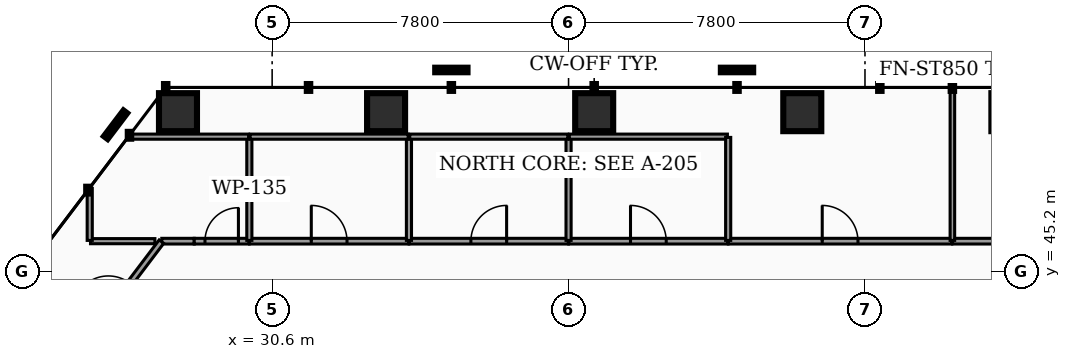
"""IFC4 building model, lengths in metres.
Left out: names, types, materials, properties, quantities, classifications, styles, units other than length and angle.
Written with IfcOpenShell. Run it as: python <this file> out.ifc"""

import sys

from ifc_helpers import new_model, si_unit, direction, frame, frame_2d, origin, origin_2d, place, context, subcontext, project, spatial, rectangle, hollow_rectangle, extrude, element, fill, save


model = new_model("IFC4")
c1 = context("Model", 3, precision=1e-05, world=origin(), true_north=direction((0.0, 1.0)))
c2 = subcontext(c1, "Body", "Model", "MODEL_VIEW")
j1 = project(units=[si_unit("LENGTHUNIT", "METRE"), si_unit("PLANEANGLEUNIT", "RADIAN")], contexts=[c1])
p1 = place(None, origin())
s1 = spatial("IfcSite", under=j1, at=p1, CompositionType="ELEMENT")
p2 = place(p1, origin())
s2 = spatial("IfcBuilding", under=s1, at=p2, CompositionType="ELEMENT")
p3 = place(p2, frame((0.0, 0.0, 39.78)))
s3 = spatial("IfcBuildingStorey", under=s2, at=p3, CompositionType="ELEMENT", Elevation=39.78)
for number, where, z_axis, x_axis in (
    (1, (44.55, 49.394, 0.0), (0.0, 0.0, 1.0), (1.0, 0.0, 0.0)),
    (2, (39.074, 49.394, 0.0), (0.0, 0.0, 1.0), (1.0, 0.0, 0.0)),
    (3, (33.598, 49.394, 0.0), (0.0, 0.0, 1.0), (1.0, 0.0, 0.0)),
    (4, (28.122, 49.394, 0.0), (0.0, 0.0, 1.0), (1.0, 0.0, 0.0)),
):
    element("IfcColumn", number, at=place(p3, frame(where, z_axis=z_axis, x_axis=x_axis)), inside=s3, PredefinedType="COLUMN", context=c2, shape_type="SweptSolid", body=[
        extrude(hollow_rectangle(XDim=1.0, YDim=1.0, WallThickness=0.05, at=origin_2d()), origin(), (0.0, 0.0, 1.0), 3.82),
    ])
p4 = place(p3, frame((27.696, 46.0, 0.0), z_axis=(0.0, 0.0, 1.0), x_axis=(1.0, 0.0, 0.0)))
e5 = element("IfcWall", 5, at=p4, inside=s3, PredefinedType="PARTITIONING", context=c2, shape_type="SweptSolid", body=[
    extrude(rectangle(XDim=0.854, YDim=0.15, at=frame_2d((0.427, 0.0))), origin(), (0.0, 0.0, 1.0), 2.777),
])
p5 = place(p3, frame((28.55, 46.0, 0.0), z_axis=(0.0, 0.0, 1.0), x_axis=(1.0, 0.0, 0.0)))
e6 = element("IfcWall", 6, at=p5, inside=s3, PredefinedType="PARTITIONING", context=c2, shape_type="SweptSolid", body=[
    extrude(rectangle(XDim=1.445, YDim=0.15, at=frame_2d((0.723, 0.0))), origin(), (0.0, 0.0, 1.0), 2.777),
])
p6 = place(p5, frame((0.282, 0.0, 0.0)))
e7 = element("IfcOpeningElement", 7, at=p6, cuts=e6, PredefinedType="OPENING", context=c2, shape_type="SweptSolid", body=[
    extrude(rectangle(XDim=0.88, YDim=2.05, at=frame_2d((0.44, 1.025))), frame((0.0, 0.085, 0.0), z_axis=(0.0, -1.0, 0.0), x_axis=(1.0, 0.0, 0.0)), (0.0, 0.0, 1.0), 0.17),
])
p7 = place(p3, frame((30.005, 46.0, 0.0), z_axis=(0.0, 0.0, 1.0), x_axis=(1.0, 0.0, 0.0)))
e8 = element("IfcWall", 8, at=p7, inside=s3, PredefinedType="PARTITIONING", context=c2, shape_type="SweptSolid", body=[
    extrude(rectangle(XDim=4.19, YDim=0.15, at=frame_2d((2.095, 0.0))), origin(), (0.0, 0.0, 1.0), 2.777),
])
p8 = place(p7, frame((1.625, 0.0, 0.0)))
e9 = element("IfcOpeningElement", 9, at=p8, cuts=e8, PredefinedType="OPENING", context=c2, shape_type="SweptSolid", body=[
    extrude(rectangle(XDim=0.94, YDim=2.05, at=frame_2d((0.47, 1.025))), frame((0.0, 0.085, 0.0), z_axis=(0.0, -1.0, 0.0), x_axis=(1.0, 0.0, 0.0)), (0.0, 0.0, 1.0), 0.17),
])
p9 = place(p3, frame((34.205, 46.0, 0.0), z_axis=(0.0, 0.0, 1.0), x_axis=(1.0, 0.0, 0.0)))
e10 = element("IfcWall", 10, at=p9, inside=s3, PredefinedType="PARTITIONING", context=c2, shape_type="SweptSolid", body=[
    extrude(rectangle(XDim=4.19, YDim=0.15, at=frame_2d((2.095, 0.0))), origin(), (0.0, 0.0, 1.0), 2.777),
])
p10 = place(p9, frame((1.625, 0.0, 0.0)))
e11 = element("IfcOpeningElement", 11, at=p10, cuts=e10, PredefinedType="OPENING", context=c2, shape_type="SweptSolid", body=[
    extrude(rectangle(XDim=0.94, YDim=2.05, at=frame_2d((0.47, 1.025))), frame((0.0, 0.085, 0.0), z_axis=(0.0, -1.0, 0.0), x_axis=(1.0, 0.0, 0.0)), (0.0, 0.0, 1.0), 0.17),
])
p11 = place(p3, frame((38.405, 46.0, 0.0), z_axis=(0.0, 0.0, 1.0), x_axis=(1.0, 0.0, 0.0)))
e12 = element("IfcWall", 12, at=p11, inside=s3, PredefinedType="PARTITIONING", context=c2, shape_type="SweptSolid", body=[
    extrude(rectangle(XDim=4.19, YDim=0.15, at=frame_2d((2.095, 0.0))), origin(), (0.0, 0.0, 1.0), 2.777),
])
p12 = place(p11, frame((1.625, 0.0, 0.0)))
e13 = element("IfcOpeningElement", 13, at=p12, cuts=e12, PredefinedType="OPENING", context=c2, shape_type="SweptSolid", body=[
    extrude(rectangle(XDim=0.94, YDim=2.05, at=frame_2d((0.47, 1.025))), frame((0.0, 0.085, 0.0), z_axis=(0.0, -1.0, 0.0), x_axis=(1.0, 0.0, 0.0)), (0.0, 0.0, 1.0), 0.17),
])
p13 = place(p3, frame((25.462, 43.051, 0.0), z_axis=(0.0, 0.0, 1.0), x_axis=(0.603862791153, 0.7970882821, 0.0)))
e14 = element("IfcWall", 14, at=p13, inside=s3, PredefinedType="PARTITIONING", context=c2, shape_type="SweptSolid", body=[
    extrude(rectangle(XDim=3.684, YDim=0.15, at=frame_2d((1.842, 0.0))), origin(), (0.0, 0.0, 1.0), 2.777),
])
p14 = place(p13, frame((1.372, 0.0, 0.0)))
e15 = element("IfcOpeningElement", 15, at=p14, cuts=e14, PredefinedType="OPENING", context=c2, shape_type="SweptSolid", body=[
    extrude(rectangle(XDim=0.94, YDim=2.05, at=frame_2d((0.47, 1.025))), frame((0.0, 0.085, 0.0), z_axis=(0.0, -1.0, 0.0), x_axis=(1.0, 0.0, 0.0)), (0.0, 0.0, 1.0), 0.17),
])
p15 = place(p3, frame((48.505, 46.0, 0.0), z_axis=(0.0, 0.0, 1.0), x_axis=(1.0, 0.0, 0.0)))
e16 = element("IfcWall", 16, at=p15, inside=s3, PredefinedType="PARTITIONING", context=c2, shape_type="SweptSolid", body=[
    extrude(rectangle(XDim=1.925, YDim=0.15, at=frame_2d((0.962, 0.0))), origin(), (0.0, 0.0, 1.0), 2.777),
])
p16 = place(p3, frame((42.605, 46.0, 0.0), z_axis=(0.0, 0.0, 1.0), x_axis=(1.0, 0.0, 0.0)))
e17 = element("IfcWall", 17, at=p16, inside=s3, PredefinedType="PARTITIONING", context=c2, shape_type="SweptSolid", body=[
    extrude(rectangle(XDim=5.88, YDim=0.15, at=frame_2d((2.94, 0.0))), origin(), (0.0, 0.0, 1.0), 2.777),
])
p17 = place(p16, frame((2.47, 0.0, 0.0)))
e18 = element("IfcOpeningElement", 18, at=p17, cuts=e17, PredefinedType="OPENING", context=c2, shape_type="SweptSolid", body=[
    extrude(rectangle(XDim=0.94, YDim=2.05, at=frame_2d((0.47, 1.025))), frame((0.0, 0.085, 0.0), z_axis=(0.0, -1.0, 0.0), x_axis=(1.0, 0.0, 0.0)), (0.0, 0.0, 1.0), 0.17),
])
p18 = place(p3, frame((30.0, 46.02, 0.0), z_axis=(0.0, 0.0, 1.0), x_axis=(0.0, 1.0, 0.0)))
e19 = element("IfcWall", 19, at=p18, inside=s3, PredefinedType="PARTITIONING", context=c2, shape_type="SweptSolid", body=[
    extrude(rectangle(XDim=2.71, YDim=0.135, at=frame_2d((1.355, 0.0))), origin(), (0.0, 0.0, 1.0), 2.777),
])
p19 = place(p3, frame((25.82, 46.0, 0.0), z_axis=(0.0, 0.0, 1.0), x_axis=(1.0, 0.0, 0.0)))
e20 = element("IfcWall", 20, at=p19, inside=s3, PredefinedType="PARTITIONING", context=c2, shape_type="SweptSolid", body=[
    extrude(rectangle(XDim=1.695, YDim=0.135, at=frame_2d((0.847, 0.0))), origin(), (0.0, 0.0, 1.0), 2.777),
])
p20 = place(p3, frame((25.8, 46.02, 0.0), z_axis=(0.0, 0.0, 1.0), x_axis=(0.0, 1.0, 0.0)))
e21 = element("IfcWall", 21, at=p20, inside=s3, PredefinedType="PARTITIONING", context=c2, shape_type="SweptSolid", body=[
    extrude(rectangle(XDim=1.371, YDim=0.135, at=frame_2d((0.685, 0.0))), origin(), (0.0, 0.0, 1.0), 2.777),
])
p21 = place(p3, frame((26.833, 48.75, 0.0), z_axis=(0.0, 0.0, 1.0), x_axis=(1.0, 0.0, 0.0)))
e22 = element("IfcWall", 22, at=p21, inside=s3, PredefinedType="PARTITIONING", context=c2, shape_type="SweptSolid", body=[
    extrude(rectangle(XDim=3.146, YDim=0.135, at=frame_2d((1.573, 0.0))), origin(), (0.0, 0.0, 1.0), 2.777),
])
p22 = place(p3, frame((34.2, 46.02, 0.0), z_axis=(0.0, 0.0, 1.0), x_axis=(0.0, 1.0, 0.0)))
e23 = element("IfcWall", 23, at=p22, inside=s3, PredefinedType="PARTITIONING", context=c2, shape_type="SweptSolid", body=[
    extrude(rectangle(XDim=2.71, YDim=0.135, at=frame_2d((1.355, 0.0))), origin(), (0.0, 0.0, 1.0), 2.777),
])
p23 = place(p3, frame((30.02, 48.75, 0.0), z_axis=(0.0, 0.0, 1.0), x_axis=(1.0, 0.0, 0.0)))
e24 = element("IfcWall", 24, at=p23, inside=s3, PredefinedType="PARTITIONING", context=c2, shape_type="SweptSolid", body=[
    extrude(rectangle(XDim=4.16, YDim=0.135, at=frame_2d((2.08, 0.0))), origin(), (0.0, 0.0, 1.0), 2.777),
])
p24 = place(p3, frame((38.4, 46.02, 0.0), z_axis=(0.0, 0.0, 1.0), x_axis=(0.0, 1.0, 0.0)))
e25 = element("IfcWall", 25, at=p24, inside=s3, PredefinedType="PARTITIONING", context=c2, shape_type="SweptSolid", body=[
    extrude(rectangle(XDim=2.71, YDim=0.135, at=frame_2d((1.355, 0.0))), origin(), (0.0, 0.0, 1.0), 2.777),
])
p25 = place(p3, frame((34.22, 48.75, 0.0), z_axis=(0.0, 0.0, 1.0), x_axis=(1.0, 0.0, 0.0)))
e26 = element("IfcWall", 26, at=p25, inside=s3, PredefinedType="PARTITIONING", context=c2, shape_type="SweptSolid", body=[
    extrude(rectangle(XDim=4.16, YDim=0.135, at=frame_2d((2.08, 0.0))), origin(), (0.0, 0.0, 1.0), 2.777),
])
p26 = place(p3, frame((38.42, 48.75, 0.0), z_axis=(0.0, 0.0, 1.0), x_axis=(1.0, 0.0, 0.0)))
e27 = element("IfcWall", 27, at=p26, inside=s3, PredefinedType="PARTITIONING", context=c2, shape_type="SweptSolid", body=[
    extrude(rectangle(XDim=4.16, YDim=0.135, at=frame_2d((2.08, 0.0))), origin(), (0.0, 0.0, 1.0), 2.777),
])
p27 = place(p3, frame((42.6, 46.02, 0.0), z_axis=(0.0, 0.0, 1.0), x_axis=(0.0, 1.0, 0.0)))
e28 = element("IfcWall", 28, at=p27, inside=s3, PredefinedType="PARTITIONING", context=c2, shape_type="SweptSolid", body=[
    extrude(rectangle(XDim=2.71, YDim=0.135, at=frame_2d((1.355, 0.0))), origin(), (0.0, 0.0, 1.0), 2.777),
])
p28 = place(p3, frame((48.5, 46.02, 0.0), z_axis=(0.0, 0.0, 1.0), x_axis=(0.0, 1.0, 0.0)))
e29 = element("IfcWall", 29, at=p28, inside=s3, PredefinedType="PARTITIONING", context=c2, shape_type="SweptSolid", body=[
    extrude(rectangle(XDim=4.009, YDim=0.12, at=frame_2d((2.005, 0.0))), origin(), (0.0, 0.0, 1.0), 2.777),
])
p29 = place(p6, origin())
e30 = element("IfcDoor", 30, at=p29, inside=s3, OperationType="SINGLE_SWING_RIGHT", PredefinedType="DOOR", context=c2, shape_type="SweptSolid", body=[
    extrude(rectangle(XDim=0.88, YDim=2.05, at=frame_2d((0.44, 1.025))), frame((0.0, 0.025, 0.0), z_axis=(0.0, -1.0, 0.0), x_axis=(1.0, 0.0, 0.0)), (0.0, 0.0, 1.0), 0.05),
])
fill(e7, e30)
p30 = place(p8, origin())
e31 = element("IfcDoor", 31, at=p30, inside=s3, OperationType="SINGLE_SWING_LEFT", PredefinedType="DOOR", context=c2, shape_type="SweptSolid", body=[
    extrude(rectangle(XDim=0.94, YDim=2.05, at=frame_2d((0.47, 1.025))), frame((0.0, 0.025, 0.0), z_axis=(0.0, -1.0, 0.0), x_axis=(1.0, 0.0, 0.0)), (0.0, 0.0, 1.0), 0.05),
])
fill(e9, e31)
p31 = place(p10, origin())
e32 = element("IfcDoor", 32, at=p31, inside=s3, OperationType="SINGLE_SWING_RIGHT", PredefinedType="DOOR", context=c2, shape_type="SweptSolid", body=[
    extrude(rectangle(XDim=0.94, YDim=2.05, at=frame_2d((0.47, 1.025))), frame((0.0, 0.025, 0.0), z_axis=(0.0, -1.0, 0.0), x_axis=(1.0, 0.0, 0.0)), (0.0, 0.0, 1.0), 0.05),
])
fill(e11, e32)
p32 = place(p12, origin())
e33 = element("IfcDoor", 33, at=p32, inside=s3, OperationType="SINGLE_SWING_LEFT", PredefinedType="DOOR", context=c2, shape_type="SweptSolid", body=[
    extrude(rectangle(XDim=0.94, YDim=2.05, at=frame_2d((0.47, 1.025))), frame((0.0, 0.025, 0.0), z_axis=(0.0, -1.0, 0.0), x_axis=(1.0, 0.0, 0.0)), (0.0, 0.0, 1.0), 0.05),
])
fill(e13, e33)
p33 = place(p17, origin())
e34 = element("IfcDoor", 34, at=p33, inside=s3, OperationType="SINGLE_SWING_LEFT", PredefinedType="DOOR", context=c2, shape_type="SweptSolid", body=[
    extrude(rectangle(XDim=0.94, YDim=2.05, at=frame_2d((0.47, 1.025))), frame((0.0, 0.025, 0.0), z_axis=(0.0, -1.0, 0.0), x_axis=(1.0, 0.0, 0.0)), (0.0, 0.0, 1.0), 0.05),
])
fill(e18, e34)
save(model, sys.argv[1])
